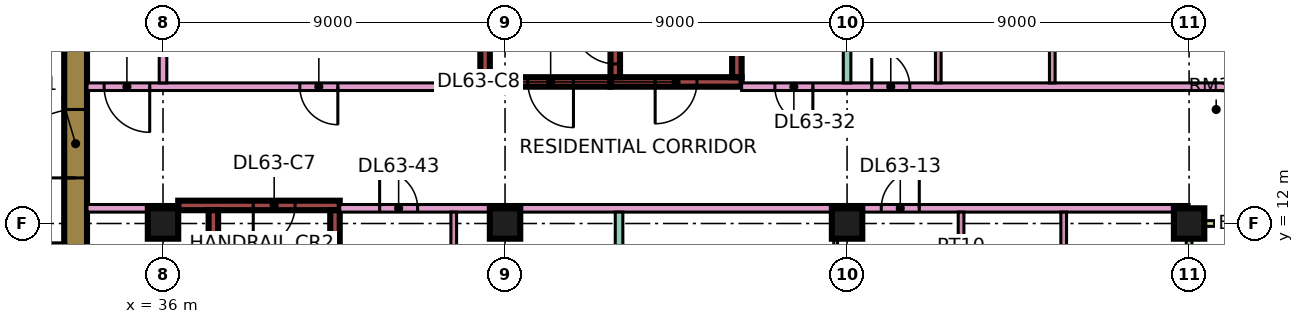
"""IFC4 building model, lengths in metres.
Left out: names, types, materials, properties, quantities, classifications, styles, units other than length and angle.
Written with IfcOpenShell. Run it as: python <this file> out.ifc"""

import sys

from ifc_helpers import new_model, si_unit, direction, frame, frame_2d, origin, origin_2d, place, context, subcontext, project, spatial, rectangle, extrude, element, fill, save


model = new_model("IFC4")
c1 = context("Model", 3, precision=1e-05, world=origin(), true_north=direction((0.0, 1.0)))
c2 = subcontext(c1, "Body", "Model", "MODEL_VIEW")
j1 = project(units=[si_unit("LENGTHUNIT", "METRE"), si_unit("PLANEANGLEUNIT", "RADIAN")], contexts=[c1])
p1 = place(None, origin())
s1 = spatial("IfcSite", under=j1, at=p1, CompositionType="ELEMENT")
p2 = place(p1, origin())
s2 = spatial("IfcBuilding", under=s1, at=p2, CompositionType="ELEMENT")
p3 = place(p2, frame((0.0, 0.0, 273.4)))
s3 = spatial("IfcBuildingStorey", under=s2, at=p3, CompositionType="ELEMENT", Elevation=273.4)
for number, where, z_axis, x_axis in (
    (1, (36.0, 12.0, 0.0), (0.0, 0.0, 1.0), (1.0, 0.0, 0.0)),
    (2, (45.0, 12.0, 0.0), (0.0, 0.0, 1.0), (1.0, 0.0, 0.0)),
    (3, (54.0, 12.0, 0.0), (0.0, 0.0, 1.0), (1.0, 0.0, 0.0)),
    (4, (63.0, 12.0, 0.0), (0.0, 0.0, 1.0), (1.0, 0.0, 0.0)),
):
    element("IfcColumn", number, at=place(p3, frame(where, z_axis=z_axis, x_axis=x_axis)), inside=s3, PredefinedType="COLUMN", context=c2, shape_type="SweptSolid", body=[
        extrude(rectangle(XDim=0.8, YDim=0.8, at=origin_2d()), origin(), (0.0, 0.0, 1.0), 3.75),
    ])
p4 = place(p3, frame((33.7, 7.6, 0.0), z_axis=(0.0, 0.0, 1.0), x_axis=(0.0, 1.0, 0.0)))
e5 = element("IfcWall", 5, at=p4, inside=s3, PredefinedType="SHEAR", context=c2, shape_type="SweptSolid", body=[
    extrude(rectangle(XDim=11.8, YDim=0.6, at=frame_2d((5.9, 0.0))), origin(), (0.0, 0.0, 1.0), 3.75),
])
p5 = place(p4, frame((5.6, 0.0, 0.0)))
e6 = element("IfcOpeningElement", 6, at=p5, cuts=e5, PredefinedType="OPENING", context=c2, shape_type="SweptSolid", body=[
    extrude(rectangle(XDim=1.8, YDim=2.4, at=frame_2d((0.9, 1.2))), frame((0.0, 0.31, 0.0), z_axis=(0.0, -1.0, 0.0), x_axis=(1.0, 0.0, 0.0)), (0.0, 0.0, 1.0), 0.62),
])
p6 = place(p3, frame((36.4, 12.475, 0.0), z_axis=(0.0, 0.0, 1.0), x_axis=(1.0, 0.0, 0.0)))
e7 = element("IfcWall", 7, at=p6, inside=s3, PredefinedType="SHEAR", context=c2, shape_type="SweptSolid", body=[
    extrude(rectangle(XDim=4.25, YDim=0.25, at=frame_2d((2.125, 0.0))), origin(), (0.0, 0.0, 1.0), 3.75),
])
p7 = place(p6, frame((1.975, 0.0, 0.0)))
e8 = element("IfcOpeningElement", 8, at=p7, cuts=e7, PredefinedType="OPENING", context=c2, shape_type="SweptSolid", body=[
    extrude(rectangle(XDim=1.1, YDim=2.2, at=frame_2d((0.55, 1.1))), frame((0.0, 0.135, 0.0), z_axis=(0.0, -1.0, 0.0), x_axis=(1.0, 0.0, 0.0)), (0.0, 0.0, 1.0), 0.27),
])
for number, where, z_axis, x_axis in (
    (9, (37.325, 5.85, 0.0), (0.0, 0.0, 1.0), (0.0, 1.0, 0.0)),
    (10, (40.525, 5.85, 0.0), (0.0, 0.0, 1.0), (0.0, 1.0, 0.0)),
):
    element("IfcWall", number, at=place(p3, frame(where, z_axis=z_axis, x_axis=x_axis)), inside=s3, PredefinedType="SHEAR", context=c2, shape_type="SweptSolid", body=[
        extrude(rectangle(XDim=6.5, YDim=0.25, at=frame_2d((3.25, 0.0))), origin(), (0.0, 0.0, 1.0), 3.75),
    ])
p8 = place(p3, frame((47.775, 15.725, 0.0), z_axis=(0.0, 0.0, 1.0), x_axis=(1.0, 0.0, 0.0)))
e11 = element("IfcWall", 11, at=p8, inside=s3, PredefinedType="SHEAR", context=c2, shape_type="SweptSolid", body=[
    extrude(rectangle(XDim=3.45, YDim=0.25, at=frame_2d((1.725, 0.0))), origin(), (0.0, 0.0, 1.0), 3.75),
])
p9 = place(p8, frame((1.175, 0.0, 0.0)))
e12 = element("IfcOpeningElement", 12, at=p9, cuts=e11, PredefinedType="OPENING", context=c2, shape_type="SweptSolid", body=[
    extrude(rectangle(XDim=1.1, YDim=2.2, at=frame_2d((0.55, 1.1))), frame((0.0, 0.135, 0.0), z_axis=(0.0, -1.0, 0.0), x_axis=(1.0, 0.0, 0.0)), (0.0, 0.0, 1.0), 0.27),
])
p10 = place(p3, frame((47.9, 15.85, 0.0), z_axis=(0.0, 0.0, 1.0), x_axis=(0.0, 1.0, 0.0)))
e13 = element("IfcWall", 13, at=p10, inside=s3, PredefinedType="SHEAR", context=c2, shape_type="SweptSolid", body=[
    extrude(rectangle(XDim=6.5, YDim=0.25, at=frame_2d((3.25, 0.0))), origin(), (0.0, 0.0, 1.0), 3.75),
])
p11 = place(p10, frame((0.35, 0.0, 0.0)))
e14 = element("IfcOpeningElement", 14, at=p11, cuts=e13, PredefinedType="OPENING", context=c2, shape_type="SweptSolid", body=[
    extrude(rectangle(XDim=1.1, YDim=2.2, at=frame_2d((0.55, 1.1))), frame((0.0, 0.135, 0.0), z_axis=(0.0, -1.0, 0.0), x_axis=(1.0, 0.0, 0.0)), (0.0, 0.0, 1.0), 0.27),
])
p12 = place(p3, frame((51.1, 15.85, 0.0), z_axis=(0.0, 0.0, 1.0), x_axis=(0.0, 1.0, 0.0)))
e15 = element("IfcWall", 15, at=p12, inside=s3, PredefinedType="SHEAR", context=c2, shape_type="SweptSolid", body=[
    extrude(rectangle(XDim=6.5, YDim=0.25, at=frame_2d((3.25, 0.0))), origin(), (0.0, 0.0, 1.0), 3.75),
])
p13 = place(p3, frame((44.35, 15.725, 0.0), z_axis=(0.0, 0.0, 1.0), x_axis=(1.0, 0.0, 0.0)))
e16 = element("IfcWall", 16, at=p13, inside=s3, PredefinedType="SHEAR", context=c2, shape_type="SweptSolid", body=[
    extrude(rectangle(XDim=3.425, YDim=0.25, at=frame_2d((1.712, 0.0))), origin(), (0.0, 0.0, 1.0), 3.75),
])
p14 = place(p13, frame((1.25, 0.0, 0.0)))
e17 = element("IfcOpeningElement", 17, at=p14, cuts=e16, PredefinedType="OPENING", context=c2, shape_type="SweptSolid", body=[
    extrude(rectangle(XDim=1.2, YDim=2.2, at=frame_2d((0.6, 1.1))), frame((0.0, 0.135, 0.0), z_axis=(0.0, -1.0, 0.0), x_axis=(1.0, 0.0, 0.0)), (0.0, 0.0, 1.0), 0.27),
])
p15 = place(p3, frame((44.475, 15.85, 0.0), z_axis=(0.0, 0.0, 1.0), x_axis=(0.0, 1.0, 0.0)))
e18 = element("IfcWall", 18, at=p15, inside=s3, PredefinedType="SHEAR", context=c2, shape_type="SweptSolid", body=[
    extrude(rectangle(XDim=6.5, YDim=0.25, at=frame_2d((3.25, 0.0))), origin(), (0.0, 0.0, 1.0), 3.75),
])
p16 = place(p15, frame((1.75, 0.0, 0.0)))
e19 = element("IfcOpeningElement", 19, at=p16, cuts=e18, PredefinedType="OPENING", context=c2, shape_type="SweptSolid", body=[
    extrude(rectangle(XDim=1.1, YDim=2.2, at=frame_2d((0.55, 1.1))), frame((0.0, 0.135, 0.0), z_axis=(0.0, -1.0, 0.0), x_axis=(1.0, 0.0, 0.0)), (0.0, 0.0, 1.0), 0.27),
])
p17 = place(p15, frame((4.3, 0.0, 0.0)))
e20 = element("IfcOpeningElement", 20, at=p17, cuts=e18, PredefinedType="OPENING", context=c2, shape_type="SweptSolid", body=[
    extrude(rectangle(XDim=1.1, YDim=2.2, at=frame_2d((0.55, 1.1))), frame((0.0, 0.135, 0.0), z_axis=(0.0, -1.0, 0.0), x_axis=(1.0, 0.0, 0.0)), (0.0, 0.0, 1.0), 0.27),
])
p18 = place(p3, frame((63.0, 1.575, 0.0), z_axis=(0.0, 0.0, 1.0), x_axis=(0.0, 1.0, 0.0)))
e21 = element("IfcWall", 21, at=p18, inside=s3, PredefinedType="SOLIDWALL", context=c2, shape_type="SweptSolid", body=[
    extrude(rectangle(XDim=10.35, YDim=0.15, at=frame_2d((5.175, 0.0))), origin(), (0.0, 0.0, 1.0), 3.35),
])
p19 = place(p18, frame((1.812, 0.0, 0.0)))
e22 = element("IfcOpeningElement", 22, at=p19, cuts=e21, PredefinedType="OPENING", context=c2, shape_type="SweptSolid", body=[
    extrude(rectangle(XDim=1.8, YDim=2.4, at=frame_2d((0.9, 1.2))), frame((0.0, 0.085, 0.0), z_axis=(0.0, -1.0, 0.0), x_axis=(1.0, 0.0, 0.0)), (0.0, 0.0, 1.0), 0.17),
])
p20 = place(p18, frame((7.675, 0.0, 1.7)))
e23 = element("IfcOpeningElement", 23, at=p20, cuts=e21, PredefinedType="OPENING", context=c2, shape_type="SweptSolid", body=[
    extrude(rectangle(XDim=1.2, YDim=0.9, at=frame_2d((0.6, 0.45))), frame((0.0, 0.085, 0.0), z_axis=(0.0, -1.0, 0.0), x_axis=(1.0, 0.0, 0.0)), (0.0, 0.0, 1.0), 0.17),
])
p21 = place(p3, frame((64.5, 12.0, 0.0), z_axis=(0.0, 0.0, 1.0), x_axis=(-1.0, 0.0, 0.0)))
e24 = element("IfcWall", 24, at=p21, inside=s3, PredefinedType="SOLIDWALL", context=c2, shape_type="SweptSolid", body=[
    extrude(rectangle(XDim=1.5, YDim=0.15, at=frame_2d((0.75, 0.0))), origin(), (0.0, 0.0, 1.0), 3.35),
])
p22 = place(p3, frame((34.0, 12.4, 0.0), z_axis=(0.0, 0.0, 1.0), x_axis=(1.0, 0.0, 0.0)))
e25 = element("IfcWall", 25, at=p22, inside=s3, PredefinedType="PARTITIONING", context=c2, shape_type="SweptSolid", body=[
    extrude(rectangle(XDim=2.401, YDim=0.2, at=frame_2d((1.2, 0.0))), origin(), (0.0, 0.0, 1.0), 3.35),
])
p23 = place(p3, frame((34.0, 15.6, 0.0), z_axis=(0.0, 0.0, 1.0), x_axis=(1.0, 0.0, 0.0)))
e26 = element("IfcWall", 26, at=p23, inside=s3, PredefinedType="PARTITIONING", context=c2, shape_type="SweptSolid", body=[
    extrude(rectangle(XDim=10.35, YDim=0.2, at=frame_2d((5.175, 0.0))), origin(), (0.0, 0.0, 1.0), 3.35),
])
p24 = place(p23, frame((5.6, 0.0, 0.0)))
e27 = element("IfcOpeningElement", 27, at=p24, cuts=e26, PredefinedType="OPENING", context=c2, shape_type="SweptSolid", body=[
    extrude(rectangle(XDim=1.0, YDim=2.1, at=frame_2d((0.5, 1.05))), frame((0.0, 0.11, 0.0), z_axis=(0.0, -1.0, 0.0), x_axis=(1.0, 0.0, 0.0)), (0.0, 0.0, 1.0), 0.22),
])
p25 = place(p23, frame((0.45, 0.0, 0.0)))
e28 = element("IfcOpeningElement", 28, at=p25, cuts=e26, PredefinedType="OPENING", context=c2, shape_type="SweptSolid", body=[
    extrude(rectangle(XDim=1.2, YDim=2.1, at=frame_2d((0.6, 1.05))), frame((0.0, 0.11, 0.0), z_axis=(0.0, -1.0, 0.0), x_axis=(1.0, 0.0, 0.0)), (0.0, 0.0, 1.0), 0.22),
])
p26 = place(p3, frame((36.0, 15.7, 0.0), z_axis=(0.0, 0.0, 1.0), x_axis=(0.0, 1.0, 0.0)))
e29 = element("IfcWall", 29, at=p26, inside=s3, PredefinedType="PARTITIONING", context=c2, shape_type="SweptSolid", body=[
    extrude(rectangle(XDim=8.3, YDim=0.2, at=frame_2d((4.15, 0.0))), origin(), (0.0, 0.0, 1.0), 3.35),
])
p27 = place(p3, frame((40.65, 12.4, 0.0), z_axis=(0.0, 0.0, 1.0), x_axis=(1.0, 0.0, 0.0)))
e30 = element("IfcWall", 30, at=p27, inside=s3, PredefinedType="PARTITIONING", context=c2, shape_type="SweptSolid", body=[
    extrude(rectangle(XDim=22.35, YDim=0.2, at=frame_2d((11.175, 0.0))), origin(), (0.0, 0.0, 1.0), 3.35),
])
p28 = place(p27, frame((14.25, 0.0, 0.0)))
e31 = element("IfcOpeningElement", 31, at=p28, cuts=e30, PredefinedType="OPENING", context=c2, shape_type="SweptSolid", body=[
    extrude(rectangle(XDim=1.0, YDim=2.1, at=frame_2d((0.5, 1.05))), frame((0.0, 0.11, 0.0), z_axis=(0.0, -1.0, 0.0), x_axis=(1.0, 0.0, 0.0)), (0.0, 0.0, 1.0), 0.22),
])
p29 = place(p27, frame((1.05, 0.0, 0.0)))
e32 = element("IfcOpeningElement", 32, at=p29, cuts=e30, PredefinedType="OPENING", context=c2, shape_type="SweptSolid", body=[
    extrude(rectangle(XDim=1.0, YDim=2.1, at=frame_2d((0.5, 1.05))), frame((0.0, 0.11, 0.0), z_axis=(0.0, -1.0, 0.0), x_axis=(1.0, 0.0, 0.0)), (0.0, 0.0, 1.0), 0.22),
])
p30 = place(p3, frame((43.65, 5.825, 0.0), z_axis=(0.0, 0.0, 1.0), x_axis=(0.0, 1.0, 0.0)))
e33 = element("IfcWall", 33, at=p30, inside=s3, PredefinedType="PARTITIONING", context=c2, shape_type="SweptSolid", body=[
    extrude(rectangle(XDim=6.475, YDim=0.15, at=frame_2d((3.238, 0.0))), origin(), (0.0, 0.0, 1.0), 3.35),
])
p31 = place(p30, frame((4.425, 0.0, 0.0)))
e34 = element("IfcOpeningElement", 34, at=p31, cuts=e33, PredefinedType="OPENING", context=c2, shape_type="SweptSolid", body=[
    extrude(rectangle(XDim=0.9, YDim=2.1, at=frame_2d((0.45, 1.05))), frame((0.0, 0.085, 0.0), z_axis=(0.0, -1.0, 0.0), x_axis=(1.0, 0.0, 0.0)), (0.0, 0.0, 1.0), 0.17),
])
p32 = place(p3, frame((48.0, 0.0, 0.0), z_axis=(0.0, 0.0, 1.0), x_axis=(0.0, 1.0, 0.0)))
e35 = element("IfcWall", 35, at=p32, inside=s3, PredefinedType="PARTITIONING", context=c2, shape_type="SweptSolid", body=[
    extrude(rectangle(XDim=12.3, YDim=0.2, at=frame_2d((6.15, 0.0))), origin(), (0.0, 0.0, 1.0), 3.35),
])
p33 = place(p3, frame((51.225, 15.6, 0.0), z_axis=(0.0, 0.0, 1.0), x_axis=(1.0, 0.0, 0.0)))
e36 = element("IfcWall", 36, at=p33, inside=s3, PredefinedType="PARTITIONING", context=c2, shape_type="SweptSolid", body=[
    extrude(rectangle(XDim=13.125, YDim=0.2, at=frame_2d((6.562, 0.0))), origin(), (0.0, 0.0, 1.0), 3.35),
])
p34 = place(p33, frame((3.425, 0.0, 0.0)))
e37 = element("IfcOpeningElement", 37, at=p34, cuts=e36, PredefinedType="OPENING", context=c2, shape_type="SweptSolid", body=[
    extrude(rectangle(XDim=1.0, YDim=2.1, at=frame_2d((0.5, 1.05))), frame((0.0, 0.11, 0.0), z_axis=(0.0, -1.0, 0.0), x_axis=(1.0, 0.0, 0.0)), (0.0, 0.0, 1.0), 0.22),
])
p35 = place(p33, frame((0.875, 0.0, 0.0)))
e38 = element("IfcOpeningElement", 38, at=p35, cuts=e36, PredefinedType="OPENING", context=c2, shape_type="SweptSolid", body=[
    extrude(rectangle(XDim=1.0, YDim=2.1, at=frame_2d((0.5, 1.05))), frame((0.0, 0.11, 0.0), z_axis=(0.0, -1.0, 0.0), x_axis=(1.0, 0.0, 0.0)), (0.0, 0.0, 1.0), 0.22),
])
p36 = place(p3, frame((53.7, 8.25, 0.0), z_axis=(0.0, 0.0, 1.0), x_axis=(0.0, 1.0, 0.0)))
e39 = element("IfcWall", 39, at=p36, inside=s3, PredefinedType="PARTITIONING", context=c2, shape_type="SweptSolid", body=[
    extrude(rectangle(XDim=4.05, YDim=0.1, at=frame_2d((2.025, 0.0))), origin(), (0.0, 0.0, 1.0), 3.35),
])
p37 = place(p36, frame((1.6, 0.0, 0.0)))
e40 = element("IfcOpeningElement", 40, at=p37, cuts=e39, PredefinedType="OPENING", context=c2, shape_type="SweptSolid", body=[
    extrude(rectangle(XDim=0.9, YDim=2.1, at=frame_2d((0.45, 1.05))), frame((0.0, 0.06, 0.0), z_axis=(0.0, -1.0, 0.0), x_axis=(1.0, 0.0, 0.0)), (0.0, 0.0, 1.0), 0.12),
])
p38 = place(p3, frame((54.0, 15.7, 0.0), z_axis=(0.0, 0.0, 1.0), x_axis=(0.0, 1.0, 0.0)))
e41 = element("IfcWall", 41, at=p38, inside=s3, PredefinedType="PARTITIONING", context=c2, shape_type="SweptSolid", body=[
    extrude(rectangle(XDim=8.226, YDim=0.2, at=frame_2d((4.113, 0.0))), origin(), (0.0, 0.0, 1.0), 3.35),
])
p39 = place(p3, frame((56.4, 15.7, 0.0), z_axis=(0.0, 0.0, 1.0), x_axis=(0.0, 1.0, 0.0)))
e42 = element("IfcWall", 42, at=p39, inside=s3, PredefinedType="PARTITIONING", context=c2, shape_type="SweptSolid", body=[
    extrude(rectangle(XDim=2.825, YDim=0.15, at=frame_2d((1.413, 0.0))), origin(), (0.0, 0.0, 1.0), 3.35),
])
p40 = place(p3, frame((57.0, 8.275, 0.0), z_axis=(0.0, 0.0, 1.0), x_axis=(0.0, 1.0, 0.0)))
e43 = element("IfcWall", 43, at=p40, inside=s3, PredefinedType="PARTITIONING", context=c2, shape_type="SweptSolid", body=[
    extrude(rectangle(XDim=4.025, YDim=0.15, at=frame_2d((2.013, 0.0))), origin(), (0.0, 0.0, 1.0), 3.35),
])
p41 = place(p40, frame((1.575, 0.0, 0.0)))
e44 = element("IfcOpeningElement", 44, at=p41, cuts=e43, PredefinedType="OPENING", context=c2, shape_type="SweptSolid", body=[
    extrude(rectangle(XDim=0.8, YDim=2.1, at=frame_2d((0.4, 1.05))), frame((0.0, 0.085, 0.0), z_axis=(0.0, -1.0, 0.0), x_axis=(1.0, 0.0, 0.0)), (0.0, 0.0, 1.0), 0.17),
])
p42 = place(p3, frame((59.4, 15.7, 0.0), z_axis=(0.0, 0.0, 1.0), x_axis=(0.0, 1.0, 0.0)))
e45 = element("IfcWall", 45, at=p42, inside=s3, PredefinedType="PARTITIONING", context=c2, shape_type="SweptSolid", body=[
    extrude(rectangle(XDim=2.825, YDim=0.15, at=frame_2d((1.413, 0.0))), origin(), (0.0, 0.0, 1.0), 3.35),
])
p43 = place(p3, frame((59.7, 8.275, 0.0), z_axis=(0.0, 0.0, 1.0), x_axis=(0.0, 1.0, 0.0)))
e46 = element("IfcWall", 46, at=p43, inside=s3, PredefinedType="PARTITIONING", context=c2, shape_type="SweptSolid", body=[
    extrude(rectangle(XDim=4.025, YDim=0.15, at=frame_2d((2.013, 0.0))), origin(), (0.0, 0.0, 1.0), 3.35),
])
p44 = place(p5, origin())
e47 = element("IfcDoor", 47, at=p44, inside=s3, OperationType="DOUBLE_DOOR_SINGLE_SWING", PredefinedType="DOOR", context=c2, shape_type="SweptSolid", body=[
    extrude(rectangle(XDim=1.8, YDim=2.4, at=frame_2d((0.9, 1.2))), frame((0.0, 0.025, 0.0), z_axis=(0.0, -1.0, 0.0), x_axis=(1.0, 0.0, 0.0)), (0.0, 0.0, 1.0), 0.05),
])
fill(e6, e47)
p45 = place(p7, frame((1.1, 0.0, 0.0), z_axis=(0.0, 0.0, 1.0), x_axis=(-1.0, 0.0, 0.0)))
e48 = element("IfcDoor", 48, at=p45, inside=s3, OperationType="SINGLE_SWING_LEFT", PredefinedType="DOOR", context=c2, shape_type="SweptSolid", body=[
    extrude(rectangle(XDim=1.1, YDim=2.2, at=frame_2d((0.55, 1.1))), frame((0.0, 0.025, 0.0), z_axis=(0.0, -1.0, 0.0), x_axis=(1.0, 0.0, 0.0)), (0.0, 0.0, 1.0), 0.05),
])
fill(e8, e48)
p46 = place(p9, frame((1.1, 0.0, 0.0), z_axis=(0.0, 0.0, 1.0), x_axis=(-1.0, 0.0, 0.0)))
e49 = element("IfcDoor", 49, at=p46, inside=s3, OperationType="SINGLE_SWING_LEFT", PredefinedType="DOOR", context=c2, shape_type="SweptSolid", body=[
    extrude(rectangle(XDim=1.1, YDim=2.2, at=frame_2d((0.55, 1.1))), frame((0.0, 0.025, 0.0), z_axis=(0.0, -1.0, 0.0), x_axis=(1.0, 0.0, 0.0)), (0.0, 0.0, 1.0), 0.05),
])
fill(e12, e49)
p47 = place(p14, origin())
e50 = element("IfcDoor", 50, at=p47, inside=s3, OperationType="SINGLE_SWING_RIGHT", PredefinedType="DOOR", context=c2, shape_type="SweptSolid", body=[
    extrude(rectangle(XDim=1.2, YDim=2.2, at=frame_2d((0.6, 1.1))), frame((0.0, 0.025, 0.0), z_axis=(0.0, -1.0, 0.0), x_axis=(1.0, 0.0, 0.0)), (0.0, 0.0, 1.0), 0.05),
])
fill(e17, e50)
p48 = place(p11, frame((1.1, 0.0, 0.0), z_axis=(0.0, 0.0, 1.0), x_axis=(-1.0, 0.0, 0.0)))
e51 = element("IfcDoor", 51, at=p48, inside=s3, OperationType="SINGLE_SWING_RIGHT", PredefinedType="DOOR", context=c2, shape_type="SweptSolid", body=[
    extrude(rectangle(XDim=1.1, YDim=2.2, at=frame_2d((0.55, 1.1))), frame((0.0, 0.025, 0.0), z_axis=(0.0, -1.0, 0.0), x_axis=(1.0, 0.0, 0.0)), (0.0, 0.0, 1.0), 0.05),
])
fill(e14, e51)
p49 = place(p24, origin())
e52 = element("IfcDoor", 52, at=p49, inside=s3, OperationType="SINGLE_SWING_RIGHT", PredefinedType="DOOR", context=c2, shape_type="SweptSolid", body=[
    extrude(rectangle(XDim=1.0, YDim=2.1, at=frame_2d((0.5, 1.05))), frame((0.0, 0.025, 0.0), z_axis=(0.0, -1.0, 0.0), x_axis=(1.0, 0.0, 0.0)), (0.0, 0.0, 1.0), 0.05),
])
fill(e27, e52)
p50 = place(p34, origin())
e53 = element("IfcDoor", 53, at=p50, inside=s3, OperationType="SINGLE_SWING_LEFT", PredefinedType="DOOR", context=c2, shape_type="SweptSolid", body=[
    extrude(rectangle(XDim=1.0, YDim=2.1, at=frame_2d((0.5, 1.05))), frame((0.0, 0.025, 0.0), z_axis=(0.0, -1.0, 0.0), x_axis=(1.0, 0.0, 0.0)), (0.0, 0.0, 1.0), 0.05),
])
fill(e37, e53)
p51 = place(p28, frame((1.0, 0.0, 0.0), z_axis=(0.0, 0.0, 1.0), x_axis=(-1.0, 0.0, 0.0)))
e54 = element("IfcDoor", 54, at=p51, inside=s3, OperationType="SINGLE_SWING_RIGHT", PredefinedType="DOOR", context=c2, shape_type="SweptSolid", body=[
    extrude(rectangle(XDim=1.0, YDim=2.1, at=frame_2d((0.5, 1.05))), frame((0.0, 0.025, 0.0), z_axis=(0.0, -1.0, 0.0), x_axis=(1.0, 0.0, 0.0)), (0.0, 0.0, 1.0), 0.05),
])
fill(e31, e54)
p52 = place(p25, origin())
e55 = element("IfcDoor", 55, at=p52, inside=s3, OperationType="SINGLE_SWING_RIGHT", PredefinedType="DOOR", context=c2, shape_type="SweptSolid", body=[
    extrude(rectangle(XDim=1.2, YDim=2.1, at=frame_2d((0.6, 1.05))), frame((0.0, 0.025, 0.0), z_axis=(0.0, -1.0, 0.0), x_axis=(1.0, 0.0, 0.0)), (0.0, 0.0, 1.0), 0.05),
])
fill(e28, e55)
p53 = place(p35, origin())
e56 = element("IfcDoor", 56, at=p53, inside=s3, OperationType="SINGLE_SWING_RIGHT", PredefinedType="DOOR", context=c2, shape_type="SweptSolid", body=[
    extrude(rectangle(XDim=1.0, YDim=2.1, at=frame_2d((0.5, 1.05))), frame((0.0, 0.025, 0.0), z_axis=(0.0, -1.0, 0.0), x_axis=(1.0, 0.0, 0.0)), (0.0, 0.0, 1.0), 0.05),
])
fill(e38, e56)
p54 = place(p29, origin())
e57 = element("IfcDoor", 57, at=p54, inside=s3, OperationType="SINGLE_SWING_LEFT", PredefinedType="DOOR", context=c2, shape_type="SweptSolid", body=[
    extrude(rectangle(XDim=1.0, YDim=2.1, at=frame_2d((0.5, 1.05))), frame((0.0, 0.025, 0.0), z_axis=(0.0, -1.0, 0.0), x_axis=(1.0, 0.0, 0.0)), (0.0, 0.0, 1.0), 0.05),
])
fill(e32, e57)
save(model, sys.argv[1])
